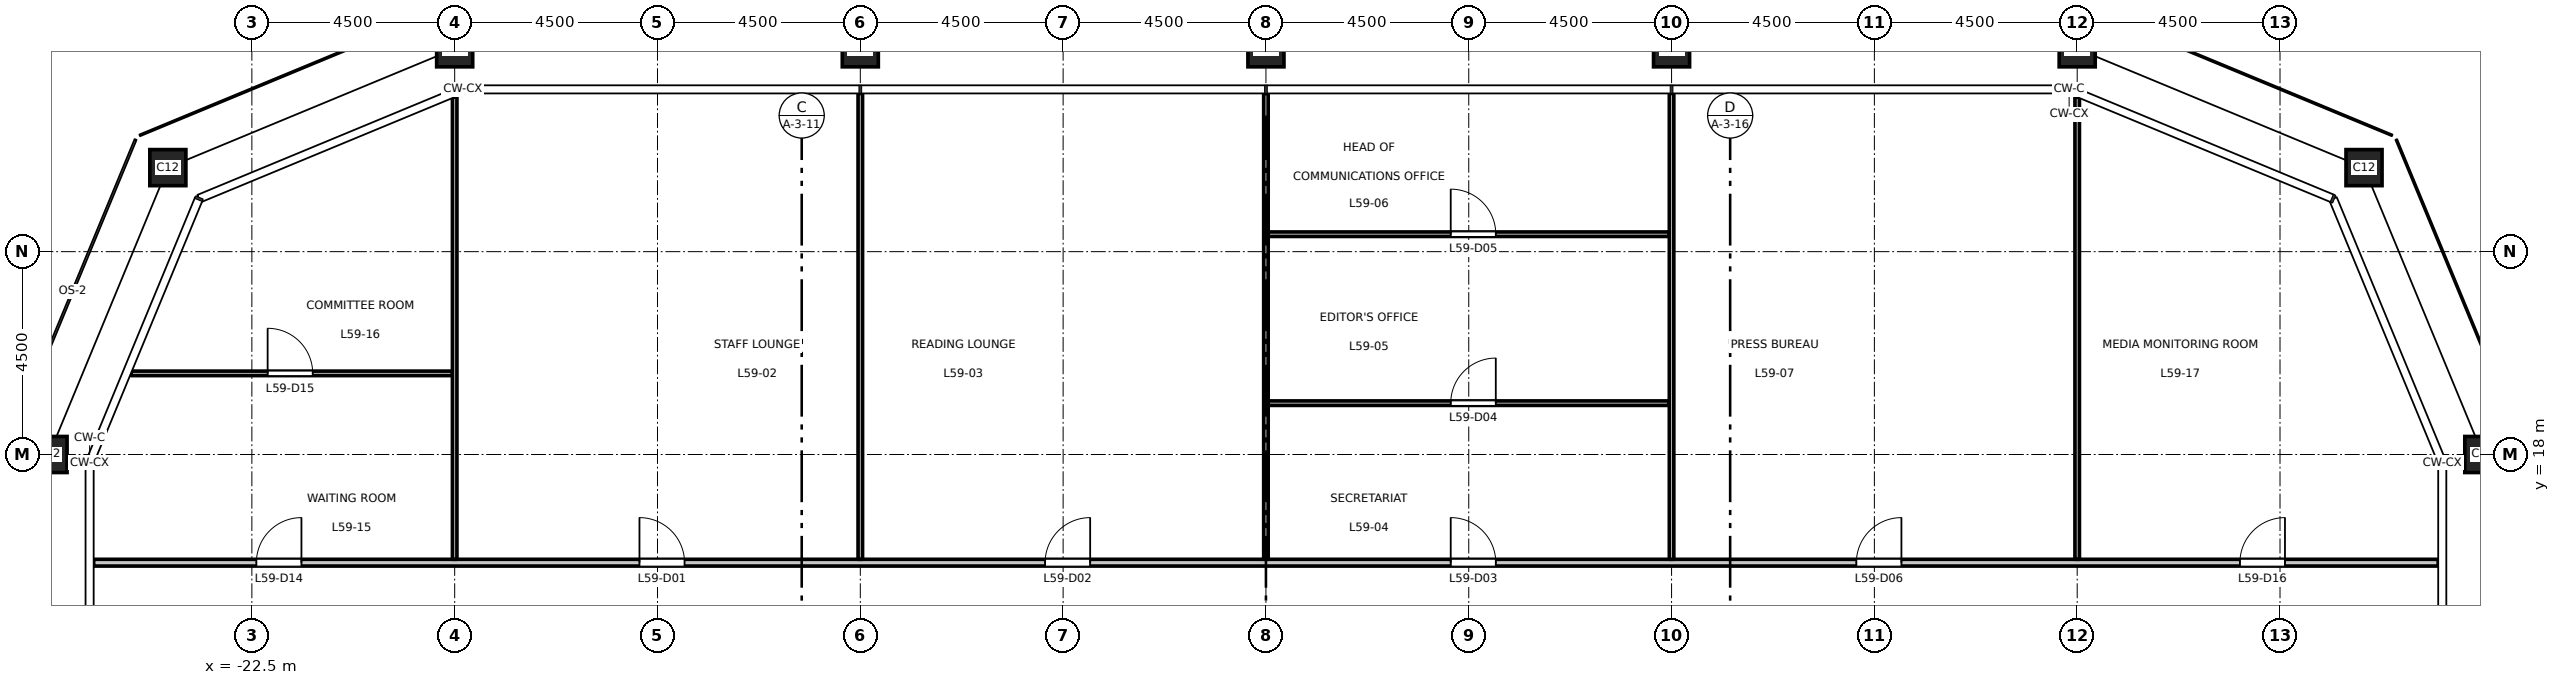
"""IFC4 building model, lengths in metres.
Left out: names, types, materials, properties, quantities, classifications, styles, units other than length and angle.
Written with IfcOpenShell. Run it as: python <this file> out.ifc"""

import sys

from ifc_helpers import new_model, si_unit, direction, frame, frame_2d, origin, origin_2d, place, context, subcontext, project, spatial, rectangle, hollow_rectangle, extrude, element, fill, save


model = new_model("IFC4")
c1 = context("Model", 3, precision=1e-05, world=origin(), true_north=direction((0.0, 1.0)))
c2 = subcontext(c1, "Body", "Model", "MODEL_VIEW")
j1 = project(units=[si_unit("LENGTHUNIT", "METRE"), si_unit("PLANEANGLEUNIT", "RADIAN")], contexts=[c1])
p1 = place(None, origin())
s1 = spatial("IfcSite", under=j1, at=p1, CompositionType="ELEMENT")
p2 = place(p1, origin())
s2 = spatial("IfcBuilding", under=s1, at=p2, CompositionType="ELEMENT")
p3 = place(p2, frame((0.0, 0.0, 273.7)))
s3 = spatial("IfcBuildingStorey", under=s2, at=p3, CompositionType="ELEMENT", Elevation=273.7)
for number, where, z_axis, x_axis in (
    (1, (27.0, 18.0, 0.0), (0.0, 0.0, 1.0), (1.0, 0.0, 0.0)),
    (2, (24.364, 24.364, 0.0), (0.0, 0.0, 1.0), (1.0, 0.0, 0.0)),
    (3, (18.0, 27.0, 0.0), (0.0, 0.0, 1.0), (1.0, 0.0, 0.0)),
    (4, (9.0, 27.0, 0.0), (0.0, 0.0, 1.0), (1.0, 0.0, 0.0)),
    (5, (0.0, 27.0, 0.0), (0.0, 0.0, 1.0), (1.0, 0.0, 0.0)),
    (6, (-9.0, 27.0, 0.0), (0.0, 0.0, 1.0), (1.0, 0.0, 0.0)),
    (7, (-18.0, 27.0, 0.0), (0.0, 0.0, 1.0), (1.0, 0.0, 0.0)),
    (8, (-24.364, 24.364, 0.0), (0.0, 0.0, 1.0), (1.0, 0.0, 0.0)),
    (9, (-27.0, 18.0, 0.0), (0.0, 0.0, 1.0), (1.0, 0.0, 0.0)),
):
    element("IfcColumn", number, at=place(p3, frame(where, z_axis=z_axis, x_axis=x_axis)), inside=s3, PredefinedType="COLUMN", context=c2, shape_type="SweptSolid", body=[
        extrude(hollow_rectangle(XDim=0.8, YDim=0.8, WallThickness=0.045, at=origin_2d()), origin(), (0.0, 0.0, 1.0), 4.5),
    ])
p4 = place(p3, frame((-26.01, 15.6, 0.0), z_axis=(0.0, 0.0, 1.0), x_axis=(1.0, 0.0, 0.0)))
e10 = element("IfcWall", 10, at=p4, inside=s3, PredefinedType="PARTITIONING", context=c2, shape_type="SweptSolid", body=[
    extrude(rectangle(XDim=52.02, YDim=0.15, at=frame_2d((26.01, 0.0))), origin(), (0.0, 0.0, 1.0), 4.3),
])
p5 = place(p4, frame((12.11, 0.0, 0.0)))
e11 = element("IfcOpeningElement", 11, at=p5, cuts=e10, PredefinedType="OPENING", context=c2, shape_type="SweptSolid", body=[
    extrude(rectangle(XDim=1.0, YDim=2.1, at=frame_2d((0.5, 1.05))), frame((0.0, 0.085, 0.0), z_axis=(0.0, -1.0, 0.0), x_axis=(1.0, 0.0, 0.0)), (0.0, 0.0, 1.0), 0.17),
])
p6 = place(p4, frame((21.11, 0.0, 0.0)))
e12 = element("IfcOpeningElement", 12, at=p6, cuts=e10, PredefinedType="OPENING", context=c2, shape_type="SweptSolid", body=[
    extrude(rectangle(XDim=1.0, YDim=2.1, at=frame_2d((0.5, 1.05))), frame((0.0, 0.085, 0.0), z_axis=(0.0, -1.0, 0.0), x_axis=(1.0, 0.0, 0.0)), (0.0, 0.0, 1.0), 0.17),
])
p7 = place(p4, frame((30.11, 0.0, 0.0)))
e13 = element("IfcOpeningElement", 13, at=p7, cuts=e10, PredefinedType="OPENING", context=c2, shape_type="SweptSolid", body=[
    extrude(rectangle(XDim=1.0, YDim=2.1, at=frame_2d((0.5, 1.05))), frame((0.0, 0.085, 0.0), z_axis=(0.0, -1.0, 0.0), x_axis=(1.0, 0.0, 0.0)), (0.0, 0.0, 1.0), 0.17),
])
p8 = place(p4, frame((39.11, 0.0, 0.0)))
e14 = element("IfcOpeningElement", 14, at=p8, cuts=e10, PredefinedType="OPENING", context=c2, shape_type="SweptSolid", body=[
    extrude(rectangle(XDim=1.0, YDim=2.1, at=frame_2d((0.5, 1.05))), frame((0.0, 0.085, 0.0), z_axis=(0.0, -1.0, 0.0), x_axis=(1.0, 0.0, 0.0)), (0.0, 0.0, 1.0), 0.17),
])
p9 = place(p4, frame((3.61, 0.0, 0.0)))
e15 = element("IfcOpeningElement", 15, at=p9, cuts=e10, PredefinedType="OPENING", context=c2, shape_type="SweptSolid", body=[
    extrude(rectangle(XDim=1.0, YDim=2.1, at=frame_2d((0.5, 1.05))), frame((0.0, 0.085, 0.0), z_axis=(0.0, -1.0, 0.0), x_axis=(1.0, 0.0, 0.0)), (0.0, 0.0, 1.0), 0.17),
])
p10 = place(p4, frame((47.62, 0.0, 0.0)))
e16 = element("IfcOpeningElement", 16, at=p10, cuts=e10, PredefinedType="OPENING", context=c2, shape_type="SweptSolid", body=[
    extrude(rectangle(XDim=1.0, YDim=2.1, at=frame_2d((0.5, 1.05))), frame((0.0, 0.085, 0.0), z_axis=(0.0, -1.0, 0.0), x_axis=(1.0, 0.0, 0.0)), (0.0, 0.0, 1.0), 0.17),
])
p11 = place(p3, frame((0.05, 19.139, 0.0), z_axis=(0.0, 0.0, 1.0), x_axis=(1.0, 0.0, 0.0)))
e17 = element("IfcWall", 17, at=p11, inside=s3, PredefinedType="PARTITIONING", context=c2, shape_type="SweptSolid", body=[
    extrude(rectangle(XDim=8.9, YDim=0.1, at=frame_2d((4.45, 0.0))), origin(), (0.0, 0.0, 1.0), 4.3),
])
p12 = place(p11, frame((4.05, 0.0, 0.0)))
e18 = element("IfcOpeningElement", 18, at=p12, cuts=e17, PredefinedType="OPENING", context=c2, shape_type="SweptSolid", body=[
    extrude(rectangle(XDim=1.0, YDim=2.1, at=frame_2d((0.5, 1.05))), frame((0.0, 0.06, 0.0), z_axis=(0.0, -1.0, 0.0), x_axis=(1.0, 0.0, 0.0)), (0.0, 0.0, 1.0), 0.12),
])
p13 = place(p3, frame((-25.183, 19.8, 0.0), z_axis=(0.0, 0.0, 1.0), x_axis=(1.0, 0.0, 0.0)))
e19 = element("IfcWall", 19, at=p13, inside=s3, PredefinedType="PARTITIONING", context=c2, shape_type="SweptSolid", body=[
    extrude(rectangle(XDim=7.133, YDim=0.1, at=frame_2d((3.566, 0.0))), origin(), (0.0, 0.0, 1.0), 4.3),
])
p14 = place(p13, frame((3.033, 0.0, 0.0)))
e20 = element("IfcOpeningElement", 20, at=p14, cuts=e19, PredefinedType="OPENING", context=c2, shape_type="SweptSolid", body=[
    extrude(rectangle(XDim=1.0, YDim=2.1, at=frame_2d((0.5, 1.05))), frame((0.0, 0.06, 0.0), z_axis=(0.0, -1.0, 0.0), x_axis=(1.0, 0.0, 0.0)), (0.0, 0.0, 1.0), 0.12),
])
p15 = place(p3, frame((0.05, 22.887, 0.0), z_axis=(0.0, 0.0, 1.0), x_axis=(1.0, 0.0, 0.0)))
e21 = element("IfcWall", 21, at=p15, inside=s3, PredefinedType="PARTITIONING", context=c2, shape_type="SweptSolid", body=[
    extrude(rectangle(XDim=8.9, YDim=0.1, at=frame_2d((4.45, 0.0))), origin(), (0.0, 0.0, 1.0), 4.3),
])
p16 = place(p15, frame((4.05, 0.0, 0.0)))
e22 = element("IfcOpeningElement", 22, at=p16, cuts=e21, PredefinedType="OPENING", context=c2, shape_type="SweptSolid", body=[
    extrude(rectangle(XDim=1.0, YDim=2.1, at=frame_2d((0.5, 1.05))), frame((0.0, 0.06, 0.0), z_axis=(0.0, -1.0, 0.0), x_axis=(1.0, 0.0, 0.0)), (0.0, 0.0, 1.0), 0.12),
])
p17 = place(p3, frame((-18.0, 15.675, 0.0), z_axis=(0.0, 0.0, 1.0), x_axis=(0.0, 1.0, 0.0)))
e23 = element("IfcWall", 23, at=p17, inside=s3, PredefinedType="PARTITIONING", context=c2, shape_type="SweptSolid", body=[
    extrude(rectangle(XDim=10.253, YDim=0.1, at=frame_2d((5.126, 0.0))), origin(), (0.0, 0.0, 1.0), 3.6),
])
p18 = place(p3, frame((-9.0, 15.675, 0.0), z_axis=(0.0, 0.0, 1.0), x_axis=(0.0, 1.0, 0.0)))
e24 = element("IfcWall", 24, at=p18, inside=s3, PredefinedType="PARTITIONING", context=c2, shape_type="SweptSolid", body=[
    extrude(rectangle(XDim=10.335, YDim=0.1, at=frame_2d((5.167, 0.0))), origin(), (0.0, 0.0, 1.0), 3.6),
])
p19 = place(p3, frame((0.0, 15.675, 0.0), z_axis=(0.0, 0.0, 1.0), x_axis=(0.0, 1.0, 0.0)))
e25 = element("IfcWall", 25, at=p19, inside=s3, PredefinedType="PARTITIONING", context=c2, shape_type="SweptSolid", body=[
    extrude(rectangle(XDim=10.335, YDim=0.1, at=frame_2d((5.167, 0.0))), origin(), (0.0, 0.0, 1.0), 3.5),
])
p20 = place(p3, frame((9.0, 15.675, 0.0), z_axis=(0.0, 0.0, 1.0), x_axis=(0.0, 1.0, 0.0)))
e26 = element("IfcWall", 26, at=p20, inside=s3, PredefinedType="PARTITIONING", context=c2, shape_type="SweptSolid", body=[
    extrude(rectangle(XDim=10.335, YDim=0.1, at=frame_2d((5.167, 0.0))), origin(), (0.0, 0.0, 1.0), 3.6),
])
p21 = place(p3, frame((18.0, 15.675, 0.0), z_axis=(0.0, 0.0, 1.0), x_axis=(0.0, 1.0, 0.0)))
e27 = element("IfcWall", 27, at=p21, inside=s3, PredefinedType="PARTITIONING", context=c2, shape_type="SweptSolid", body=[
    extrude(rectangle(XDim=10.253, YDim=0.1, at=frame_2d((5.126, 0.0))), origin(), (0.0, 0.0, 1.0), 3.6),
])
p22 = place(p5, origin())
e28 = element("IfcDoor", 28, at=p22, inside=s3, OperationType="SINGLE_SWING_LEFT", PredefinedType="DOOR", context=c2, shape_type="SweptSolid", body=[
    extrude(rectangle(XDim=1.0, YDim=2.1, at=frame_2d((0.5, 1.05))), frame((0.0, 0.025, 0.0), z_axis=(0.0, -1.0, 0.0), x_axis=(1.0, 0.0, 0.0)), (0.0, 0.0, 1.0), 0.05),
])
fill(e11, e28)
p23 = place(p6, origin())
e29 = element("IfcDoor", 29, at=p23, inside=s3, OperationType="SINGLE_SWING_RIGHT", PredefinedType="DOOR", context=c2, shape_type="SweptSolid", body=[
    extrude(rectangle(XDim=1.0, YDim=2.1, at=frame_2d((0.5, 1.05))), frame((0.0, 0.025, 0.0), z_axis=(0.0, -1.0, 0.0), x_axis=(1.0, 0.0, 0.0)), (0.0, 0.0, 1.0), 0.05),
])
fill(e12, e29)
p24 = place(p7, origin())
e30 = element("IfcDoor", 30, at=p24, inside=s3, OperationType="SINGLE_SWING_LEFT", PredefinedType="DOOR", context=c2, shape_type="SweptSolid", body=[
    extrude(rectangle(XDim=1.0, YDim=2.1, at=frame_2d((0.5, 1.05))), frame((0.0, 0.025, 0.0), z_axis=(0.0, -1.0, 0.0), x_axis=(1.0, 0.0, 0.0)), (0.0, 0.0, 1.0), 0.05),
])
fill(e13, e30)
p25 = place(p12, origin())
e31 = element("IfcDoor", 31, at=p25, inside=s3, OperationType="SINGLE_SWING_RIGHT", PredefinedType="DOOR", context=c2, shape_type="SweptSolid", body=[
    extrude(rectangle(XDim=1.0, YDim=2.1, at=frame_2d((0.5, 1.05))), frame((0.0, 0.025, 0.0), z_axis=(0.0, -1.0, 0.0), x_axis=(1.0, 0.0, 0.0)), (0.0, 0.0, 1.0), 0.05),
])
fill(e18, e31)
p26 = place(p16, origin())
e32 = element("IfcDoor", 32, at=p26, inside=s3, OperationType="SINGLE_SWING_LEFT", PredefinedType="DOOR", context=c2, shape_type="SweptSolid", body=[
    extrude(rectangle(XDim=1.0, YDim=2.1, at=frame_2d((0.5, 1.05))), frame((0.0, 0.025, 0.0), z_axis=(0.0, -1.0, 0.0), x_axis=(1.0, 0.0, 0.0)), (0.0, 0.0, 1.0), 0.05),
])
fill(e22, e32)
p27 = place(p8, origin())
e33 = element("IfcDoor", 33, at=p27, inside=s3, OperationType="SINGLE_SWING_RIGHT", PredefinedType="DOOR", context=c2, shape_type="SweptSolid", body=[
    extrude(rectangle(XDim=1.0, YDim=2.1, at=frame_2d((0.5, 1.05))), frame((0.0, 0.025, 0.0), z_axis=(0.0, -1.0, 0.0), x_axis=(1.0, 0.0, 0.0)), (0.0, 0.0, 1.0), 0.05),
])
fill(e14, e33)
p28 = place(p9, origin())
e34 = element("IfcDoor", 34, at=p28, inside=s3, OperationType="SINGLE_SWING_RIGHT", PredefinedType="DOOR", context=c2, shape_type="SweptSolid", body=[
    extrude(rectangle(XDim=1.0, YDim=2.1, at=frame_2d((0.5, 1.05))), frame((0.0, 0.025, 0.0), z_axis=(0.0, -1.0, 0.0), x_axis=(1.0, 0.0, 0.0)), (0.0, 0.0, 1.0), 0.05),
])
fill(e15, e34)
p29 = place(p14, origin())
e35 = element("IfcDoor", 35, at=p29, inside=s3, OperationType="SINGLE_SWING_LEFT", PredefinedType="DOOR", context=c2, shape_type="SweptSolid", body=[
    extrude(rectangle(XDim=1.0, YDim=2.1, at=frame_2d((0.5, 1.05))), frame((0.0, 0.025, 0.0), z_axis=(0.0, -1.0, 0.0), x_axis=(1.0, 0.0, 0.0)), (0.0, 0.0, 1.0), 0.05),
])
fill(e20, e35)
p30 = place(p10, origin())
e36 = element("IfcDoor", 36, at=p30, inside=s3, OperationType="SINGLE_SWING_RIGHT", PredefinedType="DOOR", context=c2, shape_type="SweptSolid", body=[
    extrude(rectangle(XDim=1.0, YDim=2.1, at=frame_2d((0.5, 1.05))), frame((0.0, 0.025, 0.0), z_axis=(0.0, -1.0, 0.0), x_axis=(1.0, 0.0, 0.0)), (0.0, 0.0, 1.0), 0.05),
])
fill(e16, e36)
save(model, sys.argv[1])
